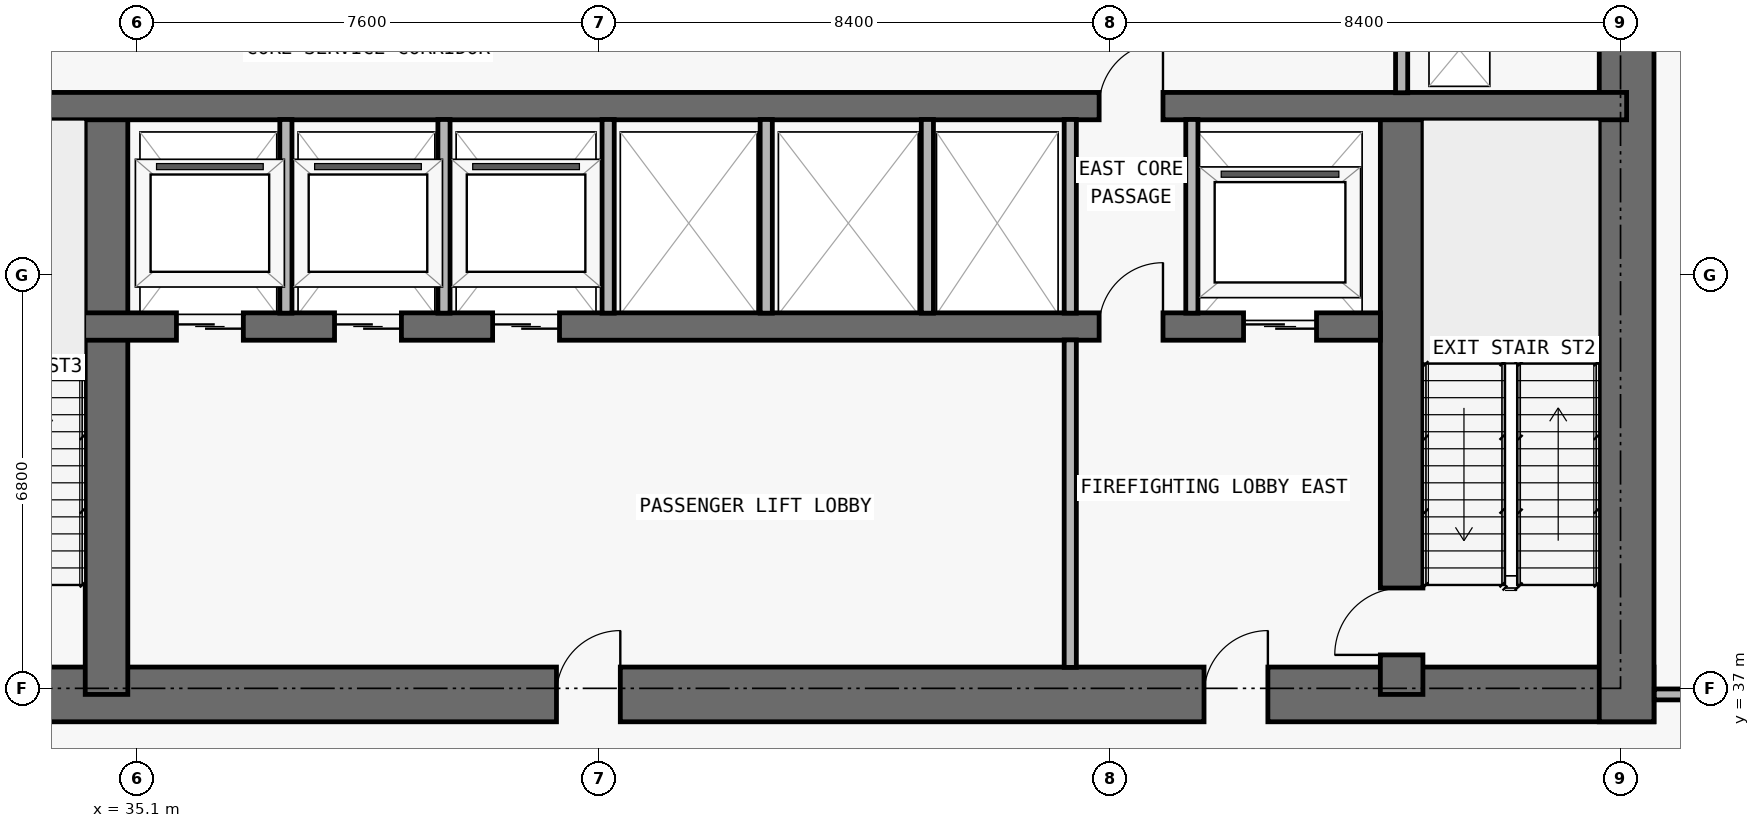
"""IFC4 building model, lengths in metres.
Left out: names, types, materials, properties, quantities, classifications, styles, units other than length and angle.
Written with IfcOpenShell. Run it as: python <this file> out.ifc"""

import sys

from ifc_helpers import new_model, si_unit, direction, frame, frame_2d, origin, place, context, subcontext, project, spatial, rectangle, extrude, element, fill, save


model = new_model("IFC4")
c1 = context("Model", 3, precision=1e-05, world=origin(), true_north=direction((0.0, 1.0)))
c2 = subcontext(c1, "Body", "Model", "MODEL_VIEW")
j1 = project(units=[si_unit("LENGTHUNIT", "METRE"), si_unit("PLANEANGLEUNIT", "RADIAN")], contexts=[c1])
p1 = place(None, origin())
s1 = spatial("IfcSite", under=j1, at=p1, CompositionType="ELEMENT")
p2 = place(p1, origin())
s2 = spatial("IfcBuilding", under=s1, at=p2, CompositionType="ELEMENT")
p3 = place(p2, frame((0.0, 0.0, 19.8)))
s3 = spatial("IfcBuildingStorey", under=s2, at=p3, CompositionType="ELEMENT", Elevation=19.8)
p4 = place(p3, frame((17.75, 36.9, 0.0), z_axis=(0.0, 0.0, 1.0), x_axis=(1.0, 0.0, 0.0)))
e1 = element("IfcWall", 1, at=p4, inside=s3, PredefinedType="SHEAR", context=c2, shape_type="SweptSolid", body=[
    extrude(rectangle(XDim=42.3, YDim=0.9, at=frame_2d((21.15, 0.0))), origin(), (0.0, 0.0, 1.0), 4.45),
])
p5 = place(p4, frame((14.55, 0.0, 0.0)))
e2 = element("IfcOpeningElement", 2, at=p5, cuts=e1, PredefinedType="OPENING", context=c2, shape_type="SweptSolid", body=[
    extrude(rectangle(XDim=1.1, YDim=2.15, at=frame_2d((0.55, 1.075))), frame((0.0, 0.46, 0.0), z_axis=(0.0, -1.0, 0.0), x_axis=(1.0, 0.0, 0.0)), (0.0, 0.0, 1.0), 0.92),
])
p6 = place(p4, frame((6.4, 0.0, 0.0)))
e3 = element("IfcOpeningElement", 3, at=p6, cuts=e1, PredefinedType="OPENING", context=c2, shape_type="SweptSolid", body=[
    extrude(rectangle(XDim=1.05, YDim=2.15, at=frame_2d((0.525, 1.075))), frame((0.0, 0.46, 0.0), z_axis=(0.0, -1.0, 0.0), x_axis=(1.0, 0.0, 0.0)), (0.0, 0.0, 1.0), 0.92),
])
p7 = place(p4, frame((34.9, 0.0, 0.0)))
e4 = element("IfcOpeningElement", 4, at=p7, cuts=e1, PredefinedType="OPENING", context=c2, shape_type="SweptSolid", body=[
    extrude(rectangle(XDim=1.05, YDim=2.15, at=frame_2d((0.525, 1.075))), frame((0.0, 0.46, 0.0), z_axis=(0.0, -1.0, 0.0), x_axis=(1.0, 0.0, 0.0)), (0.0, 0.0, 1.0), 0.92),
])
p8 = place(p4, frame((11.012, 0.0, 0.0)))
e5 = element("IfcOpeningElement", 5, at=p8, cuts=e1, PredefinedType="OPENING", context=c2, shape_type="SweptSolid", body=[
    extrude(rectangle(XDim=1.05, YDim=2.15, at=frame_2d((0.525, 1.075))), frame((0.0, 0.46, 0.0), z_axis=(0.0, -1.0, 0.0), x_axis=(1.0, 0.0, 0.0)), (0.0, 0.0, 1.0), 0.92),
])
p9 = place(p4, frame((24.25, 0.0, 0.0)))
e6 = element("IfcOpeningElement", 6, at=p9, cuts=e1, PredefinedType="OPENING", context=c2, shape_type="SweptSolid", body=[
    extrude(rectangle(XDim=1.05, YDim=2.15, at=frame_2d((0.525, 1.075))), frame((0.0, 0.46, 0.0), z_axis=(0.0, -1.0, 0.0), x_axis=(1.0, 0.0, 0.0)), (0.0, 0.0, 1.0), 0.92),
])
p10 = place(p3, frame((59.6, 36.45, 0.0), z_axis=(0.0, 0.0, 1.0), x_axis=(0.0, 1.0, 0.0)))
e7 = element("IfcWall", 7, at=p10, inside=s3, PredefinedType="SHEAR", context=c2, shape_type="SweptSolid", body=[
    extrude(rectangle(XDim=14.15, YDim=0.9, at=frame_2d((7.075, 0.0))), origin(), (0.0, 0.0, 1.0), 4.45),
])
p11 = place(p3, frame((55.9, 36.9, 0.0), z_axis=(0.0, 0.0, 1.0), x_axis=(0.0, 1.0, 0.0)))
e8 = element("IfcWall", 8, at=p11, inside=s3, PredefinedType="SHEAR", context=c2, shape_type="SweptSolid", body=[
    extrude(rectangle(XDim=9.675, YDim=0.7, at=frame_2d((4.837, 0.0))), origin(), (0.0, 0.0, 1.0), 4.45),
])
p12 = place(p11, frame((0.65, 0.0, 0.0)))
e9 = element("IfcOpeningElement", 9, at=p12, cuts=e8, PredefinedType="OPENING", context=c2, shape_type="SweptSolid", body=[
    extrude(rectangle(XDim=1.1, YDim=2.15, at=frame_2d((0.55, 1.075))), frame((0.0, 0.36, 0.0), z_axis=(0.0, -1.0, 0.0), x_axis=(1.0, 0.0, 0.0)), (0.0, 0.0, 1.0), 0.72),
])
p13 = place(p3, frame((34.6, 36.9, 0.0), z_axis=(0.0, 0.0, 1.0), x_axis=(0.0, 1.0, 0.0)))
e10 = element("IfcWall", 10, at=p13, inside=s3, PredefinedType="SHEAR", context=c2, shape_type="SweptSolid", body=[
    extrude(rectangle(XDim=9.675, YDim=0.7, at=frame_2d((4.837, 0.0))), origin(), (0.0, 0.0, 1.0), 4.45),
])
p14 = place(p3, frame((22.25, 42.95, 0.0), z_axis=(0.0, 0.0, 1.0), x_axis=(1.0, 0.0, 0.0)))
e11 = element("IfcWall", 11, at=p14, inside=s3, PredefinedType="SHEAR", context=c2, shape_type="SweptSolid", body=[
    extrude(rectangle(XDim=33.3, YDim=0.45, at=frame_2d((16.65, 0.0))), origin(), (0.0, 0.0, 1.0), 4.45),
])
p15 = place(p14, frame((1.05, 0.0, 0.0)))
e12 = element("IfcOpeningElement", 12, at=p15, cuts=e11, PredefinedType="OPENING", context=c2, shape_type="SweptSolid", body=[
    extrude(rectangle(XDim=1.2, YDim=2.2, at=frame_2d((0.6, 1.1))), frame((0.0, 0.235, 0.0), z_axis=(0.0, -1.0, 0.0), x_axis=(1.0, 0.0, 0.0)), (0.0, 0.0, 1.0), 0.47),
])
p16 = place(p14, frame((31.05, 0.0, 0.0)))
e13 = element("IfcOpeningElement", 13, at=p16, cuts=e11, PredefinedType="OPENING", context=c2, shape_type="SweptSolid", body=[
    extrude(rectangle(XDim=1.2, YDim=2.2, at=frame_2d((0.6, 1.1))), frame((0.0, 0.235, 0.0), z_axis=(0.0, -1.0, 0.0), x_axis=(1.0, 0.0, 0.0)), (0.0, 0.0, 1.0), 0.47),
])
p17 = place(p14, frame((13.5, 0.0, 0.0)))
e14 = element("IfcOpeningElement", 14, at=p17, cuts=e11, PredefinedType="OPENING", context=c2, shape_type="SweptSolid", body=[
    extrude(rectangle(XDim=1.1, YDim=2.2, at=frame_2d((0.55, 1.1))), frame((0.0, 0.235, 0.0), z_axis=(0.0, -1.0, 0.0), x_axis=(1.0, 0.0, 0.0)), (0.0, 0.0, 1.0), 0.47),
])
p18 = place(p14, frame((16.1, 0.0, 0.0)))
e15 = element("IfcOpeningElement", 15, at=p18, cuts=e11, PredefinedType="OPENING", context=c2, shape_type="SweptSolid", body=[
    extrude(rectangle(XDim=1.1, YDim=2.2, at=frame_2d((0.55, 1.1))), frame((0.0, 0.235, 0.0), z_axis=(0.0, -1.0, 0.0), x_axis=(1.0, 0.0, 0.0)), (0.0, 0.0, 1.0), 0.47),
])
p19 = place(p14, frame((18.7, 0.0, 0.0)))
e16 = element("IfcOpeningElement", 16, at=p19, cuts=e11, PredefinedType="OPENING", context=c2, shape_type="SweptSolid", body=[
    extrude(rectangle(XDim=1.1, YDim=2.2, at=frame_2d((0.55, 1.1))), frame((0.0, 0.235, 0.0), z_axis=(0.0, -1.0, 0.0), x_axis=(1.0, 0.0, 0.0)), (0.0, 0.0, 1.0), 0.47),
])
p20 = place(p14, frame((3.625, 0.0, 0.0)))
e17 = element("IfcOpeningElement", 17, at=p20, cuts=e11, PredefinedType="OPENING", context=c2, shape_type="SweptSolid", body=[
    extrude(rectangle(XDim=1.05, YDim=2.15, at=frame_2d((0.525, 1.075))), frame((0.0, 0.235, 0.0), z_axis=(0.0, -1.0, 0.0), x_axis=(1.0, 0.0, 0.0)), (0.0, 0.0, 1.0), 0.47),
])
p21 = place(p14, frame((28.675, 0.0, 0.0)))
e18 = element("IfcOpeningElement", 18, at=p21, cuts=e11, PredefinedType="OPENING", context=c2, shape_type="SweptSolid", body=[
    extrude(rectangle(XDim=1.05, YDim=2.15, at=frame_2d((0.525, 1.075))), frame((0.0, 0.235, 0.0), z_axis=(0.0, -1.0, 0.0), x_axis=(1.0, 0.0, 0.0)), (0.0, 0.0, 1.0), 0.47),
])
p22 = place(p3, frame((18.2, 46.575, 0.0), z_axis=(0.0, 0.0, 1.0), x_axis=(1.0, 0.0, 0.0)))
e19 = element("IfcWall", 19, at=p22, inside=s3, PredefinedType="SHEAR", context=c2, shape_type="SweptSolid", body=[
    extrude(rectangle(XDim=41.4, YDim=0.45, at=frame_2d((20.7, 0.0))), origin(), (0.0, 0.0, 1.0), 4.45),
])
p23 = place(p22, frame((7.675, 0.0, 0.0)))
e20 = element("IfcOpeningElement", 20, at=p23, cuts=e19, PredefinedType="OPENING", context=c2, shape_type="SweptSolid", body=[
    extrude(rectangle(XDim=1.05, YDim=2.15, at=frame_2d((0.525, 1.075))), frame((0.0, 0.235, 0.0), z_axis=(0.0, -1.0, 0.0), x_axis=(1.0, 0.0, 0.0)), (0.0, 0.0, 1.0), 0.47),
])
p24 = place(p22, frame((32.725, 0.0, 0.0)))
e21 = element("IfcOpeningElement", 21, at=p24, cuts=e19, PredefinedType="OPENING", context=c2, shape_type="SweptSolid", body=[
    extrude(rectangle(XDim=1.05, YDim=2.15, at=frame_2d((0.525, 1.075))), frame((0.0, 0.235, 0.0), z_axis=(0.0, -1.0, 0.0), x_axis=(1.0, 0.0, 0.0)), (0.0, 0.0, 1.0), 0.47),
])
for number, where, z_axis, x_axis in (
    (22, (37.55, 43.17, 0.0), (0.0, 0.0, 1.0), (0.0, 1.0, 0.0)),
    (23, (40.15, 43.17, 0.0), (0.0, 0.0, 1.0), (0.0, 1.0, 0.0)),
    (24, (42.85, 43.17, 0.0), (0.0, 0.0, 1.0), (0.0, 1.0, 0.0)),
    (25, (45.45, 43.17, 0.0), (0.0, 0.0, 1.0), (0.0, 1.0, 0.0)),
    (26, (48.1, 43.17, 0.0), (0.0, 0.0, 1.0), (0.0, 1.0, 0.0)),
):
    element("IfcWall", number, at=place(p3, frame(where, z_axis=z_axis, x_axis=x_axis)), inside=s3, PredefinedType="PARTITIONING", context=c2, shape_type="SweptSolid", body=[
        extrude(rectangle(XDim=3.185, YDim=0.2, at=frame_2d((1.593, 0.0))), origin(), (0.0, 0.0, 1.0), 4.45),
    ])
p25 = place(p3, frame((50.45, 37.345, 0.0), z_axis=(0.0, 0.0, 1.0), x_axis=(0.0, 1.0, 0.0)))
e27 = element("IfcWall", 27, at=p25, inside=s3, PredefinedType="PARTITIONING", context=c2, shape_type="SweptSolid", body=[
    extrude(rectangle(XDim=5.385, YDim=0.2, at=frame_2d((2.692, 0.0))), origin(), (0.0, 0.0, 1.0), 4.45),
])
for number, where, z_axis, x_axis in (
    (28, (50.45, 43.17, 0.0), (0.0, 0.0, 1.0), (0.0, 1.0, 0.0)),
    (29, (52.45, 43.17, 0.0), (0.0, 0.0, 1.0), (0.0, 1.0, 0.0)),
):
    element("IfcWall", number, at=place(p3, frame(where, z_axis=z_axis, x_axis=x_axis)), inside=s3, PredefinedType="PARTITIONING", context=c2, shape_type="SweptSolid", body=[
        extrude(rectangle(XDim=3.185, YDim=0.2, at=frame_2d((1.593, 0.0))), origin(), (0.0, 0.0, 1.0), 4.45),
    ])
p26 = place(p3, frame((55.9, 46.795, 0.0), z_axis=(0.0, 0.0, 1.0), x_axis=(0.0, 1.0, 0.0)))
e30 = element("IfcWall", 30, at=p26, inside=s3, PredefinedType="PARTITIONING", context=c2, shape_type="SweptSolid", body=[
    extrude(rectangle(XDim=1.605, YDim=0.2, at=frame_2d((0.802, 0.0))), origin(), (0.0, 0.0, 1.0), 4.45),
])
p27 = place(p3, frame((60.055, 36.9, 0.0), z_axis=(0.0, 0.0, 1.0), x_axis=(1.0, 0.0, 0.0)))
e31 = element("IfcWall", 31, at=p27, inside=s3, PredefinedType="PARTITIONING", context=c2, shape_type="SweptSolid", body=[
    extrude(rectangle(XDim=14.095, YDim=0.18, at=frame_2d((7.047, 0.0))), origin(), (0.0, 0.0, 1.0), 4.45),
])
p28 = place(p27, frame((6.448, 0.0, 0.0)))
e32 = element("IfcOpeningElement", 32, at=p28, cuts=e31, PredefinedType="OPENING", context=c2, shape_type="SweptSolid", body=[
    extrude(rectangle(XDim=1.2, YDim=2.2, at=frame_2d((0.6, 1.1))), frame((0.0, 0.1, 0.0), z_axis=(0.0, -1.0, 0.0), x_axis=(1.0, 0.0, 0.0)), (0.0, 0.0, 1.0), 0.2),
])
p29 = place(p16, origin())
e33 = element("IfcDoor", 33, at=p29, inside=s3, OperationType="DOUBLE_DOOR_SLIDING", PredefinedType="DOOR", context=c2, shape_type="SweptSolid", body=[
    extrude(rectangle(XDim=1.2, YDim=2.2, at=frame_2d((0.6, 1.1))), frame((0.0, 0.025, 0.0), z_axis=(0.0, -1.0, 0.0), x_axis=(1.0, 0.0, 0.0)), (0.0, 0.0, 1.0), 0.05),
])
fill(e13, e33)
p30 = place(p17, origin())
e34 = element("IfcDoor", 34, at=p30, inside=s3, OperationType="DOUBLE_DOOR_SLIDING", PredefinedType="DOOR", context=c2, shape_type="SweptSolid", body=[
    extrude(rectangle(XDim=1.1, YDim=2.2, at=frame_2d((0.55, 1.1))), frame((0.0, 0.025, 0.0), z_axis=(0.0, -1.0, 0.0), x_axis=(1.0, 0.0, 0.0)), (0.0, 0.0, 1.0), 0.05),
])
fill(e14, e34)
p31 = place(p18, origin())
e35 = element("IfcDoor", 35, at=p31, inside=s3, OperationType="DOUBLE_DOOR_SLIDING", PredefinedType="DOOR", context=c2, shape_type="SweptSolid", body=[
    extrude(rectangle(XDim=1.1, YDim=2.2, at=frame_2d((0.55, 1.1))), frame((0.0, 0.025, 0.0), z_axis=(0.0, -1.0, 0.0), x_axis=(1.0, 0.0, 0.0)), (0.0, 0.0, 1.0), 0.05),
])
fill(e15, e35)
p32 = place(p19, origin())
e36 = element("IfcDoor", 36, at=p32, inside=s3, OperationType="DOUBLE_DOOR_SLIDING", PredefinedType="DOOR", context=c2, shape_type="SweptSolid", body=[
    extrude(rectangle(XDim=1.1, YDim=2.2, at=frame_2d((0.55, 1.1))), frame((0.0, 0.025, 0.0), z_axis=(0.0, -1.0, 0.0), x_axis=(1.0, 0.0, 0.0)), (0.0, 0.0, 1.0), 0.05),
])
fill(e16, e36)
p33 = place(p7, origin())
e37 = element("IfcDoor", 37, at=p33, inside=s3, OperationType="SINGLE_SWING_RIGHT", PredefinedType="DOOR", context=c2, shape_type="SweptSolid", body=[
    extrude(rectangle(XDim=1.05, YDim=2.15, at=frame_2d((0.525, 1.075))), frame((0.0, 0.025, 0.0), z_axis=(0.0, -1.0, 0.0), x_axis=(1.0, 0.0, 0.0)), (0.0, 0.0, 1.0), 0.05),
])
fill(e4, e37)
p34 = place(p12, origin())
e38 = element("IfcDoor", 38, at=p34, inside=s3, OperationType="SINGLE_SWING_LEFT", PredefinedType="DOOR", context=c2, shape_type="SweptSolid", body=[
    extrude(rectangle(XDim=1.1, YDim=2.15, at=frame_2d((0.55, 1.075))), frame((0.0, 0.025, 0.0), z_axis=(0.0, -1.0, 0.0), x_axis=(1.0, 0.0, 0.0)), (0.0, 0.0, 1.0), 0.05),
])
fill(e9, e38)
p35 = place(p21, origin())
e39 = element("IfcDoor", 39, at=p35, inside=s3, OperationType="SINGLE_SWING_RIGHT", PredefinedType="DOOR", context=c2, shape_type="SweptSolid", body=[
    extrude(rectangle(XDim=1.05, YDim=2.15, at=frame_2d((0.525, 1.075))), frame((0.0, 0.025, 0.0), z_axis=(0.0, -1.0, 0.0), x_axis=(1.0, 0.0, 0.0)), (0.0, 0.0, 1.0), 0.05),
])
fill(e18, e39)
p36 = place(p9, origin())
e40 = element("IfcDoor", 40, at=p36, inside=s3, OperationType="SINGLE_SWING_RIGHT", PredefinedType="DOOR", context=c2, shape_type="SweptSolid", body=[
    extrude(rectangle(XDim=1.05, YDim=2.15, at=frame_2d((0.525, 1.075))), frame((0.0, 0.025, 0.0), z_axis=(0.0, -1.0, 0.0), x_axis=(1.0, 0.0, 0.0)), (0.0, 0.0, 1.0), 0.05),
])
fill(e6, e40)
p37 = place(p24, origin())
e41 = element("IfcDoor", 41, at=p37, inside=s3, OperationType="SINGLE_SWING_RIGHT", PredefinedType="DOOR", context=c2, shape_type="SweptSolid", body=[
    extrude(rectangle(XDim=1.05, YDim=2.15, at=frame_2d((0.525, 1.075))), frame((0.0, 0.025, 0.0), z_axis=(0.0, -1.0, 0.0), x_axis=(1.0, 0.0, 0.0)), (0.0, 0.0, 1.0), 0.05),
])
fill(e21, e41)
save(model, sys.argv[1])
